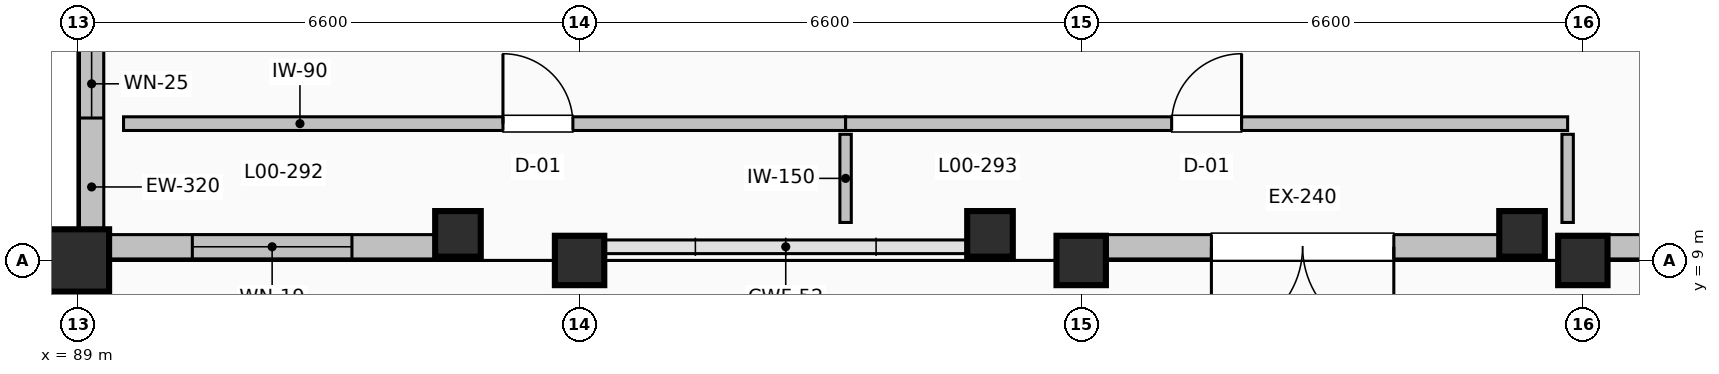
"""IFC4 building model, lengths in metres.
Left out: names, types, materials, properties, quantities, classifications, styles, units other than length and angle.
Written with IfcOpenShell. Run it as: python <this file> out.ifc"""

import sys

from ifc_helpers import new_model, si_unit, direction, frame, frame_2d, origin, origin_2d, place, context, subcontext, project, spatial, rectangle, extrude, element, fill, save


model = new_model("IFC4")
c1 = context("Model", 3, precision=1e-05, world=origin(), true_north=direction((0.0, 1.0)))
c2 = subcontext(c1, "Body", "Model", "MODEL_VIEW")
j1 = project(units=[si_unit("LENGTHUNIT", "METRE"), si_unit("PLANEANGLEUNIT", "RADIAN")], contexts=[c1])
p1 = place(None, origin())
s1 = spatial("IfcSite", under=j1, at=p1, CompositionType="ELEMENT")
p2 = place(p1, origin())
s2 = spatial("IfcBuilding", under=s1, at=p2, CompositionType="ELEMENT")
p3 = place(p2, origin())
s3 = spatial("IfcBuildingStorey", under=s2, at=p3, CompositionType="ELEMENT", Elevation=0.0)
p4 = place(p3, frame((89.0, 9.0, 0.0), z_axis=(0.0, 0.0, 1.0), x_axis=(1.0, 0.0, 0.0)))
e1 = element("IfcColumn", 1, at=p4, inside=s3, PredefinedType="COLUMN", context=c2, shape_type="SweptSolid", body=[
    extrude(rectangle(XDim=0.82, YDim=0.82, at=origin_2d()), origin(), (0.0, 0.0, 1.0), 5.4),
])
for number, where, z_axis, x_axis in (
    (2, (95.6, 9.0, 0.0), (0.0, 0.0, 1.0), (1.0, 0.0, 0.0)),
    (3, (102.2, 9.0, 0.0), (0.0, 0.0, 1.0), (1.0, 0.0, 0.0)),
    (4, (108.8, 9.0, 0.0), (0.0, 0.0, 1.0), (1.0, 0.0, 0.0)),
):
    element("IfcColumn", number, at=place(p3, frame(where, z_axis=z_axis, x_axis=x_axis)), inside=s3, PredefinedType="COLUMN", context=c2, shape_type="SweptSolid", body=[
        extrude(rectangle(XDim=0.65, YDim=0.65, at=origin_2d()), origin(), (0.0, 0.0, 1.0), 5.4),
    ])
for number, where, z_axis, x_axis in (
    (5, (94.0, 9.35, 0.0), (0.0, 0.0, 1.0), (1.0, 0.0, 0.0)),
    (6, (101.0, 9.35, 0.0), (0.0, 0.0, 1.0), (1.0, 0.0, 0.0)),
    (7, (108.0, 9.35, 0.0), (0.0, 0.0, 1.0), (1.0, 0.0, 0.0)),
):
    element("IfcColumn", number, at=place(p3, frame(where, z_axis=z_axis, x_axis=x_axis)), inside=s3, PredefinedType="PILASTER", context=c2, shape_type="SweptSolid", body=[
        extrude(rectangle(XDim=0.6, YDim=0.6, at=origin_2d()), origin(), (0.0, 0.0, 1.0), 5.4),
    ])
p5 = place(p3, frame((114.99, 9.18, 0.0), z_axis=(0.0, 0.0, 1.0), x_axis=(-1.0, 0.0, 0.0)))
e8 = element("IfcWall", 8, at=p5, inside=s3, PredefinedType="SOLIDWALL", context=c2, shape_type="SweptSolid", body=[
    extrude(rectangle(XDim=5.865, YDim=0.32, at=frame_2d((2.933, 0.0))), origin(), (0.0, 0.0, 1.0), 4.342),
])
p6 = place(p5, frame((1.732, 0.0, 0.0)))
e9 = element("IfcOpeningElement", 9, at=p6, cuts=e8, PredefinedType="OPENING", context=c2, shape_type="SweptSolid", body=[
    extrude(rectangle(XDim=2.4, YDim=2.4, at=frame_2d((1.2, 1.2))), frame((0.0, 0.17, 0.0), z_axis=(0.0, -1.0, 0.0), x_axis=(1.0, 0.0, 0.0)), (0.0, 0.0, 1.0), 0.34),
])
p7 = place(p3, frame((107.7, 9.18, 0.0), z_axis=(0.0, 0.0, 1.0), x_axis=(-1.0, 0.0, 0.0)))
e10 = element("IfcWall", 10, at=p7, inside=s3, PredefinedType="SOLIDWALL", context=c2, shape_type="SweptSolid", body=[
    extrude(rectangle(XDim=5.175, YDim=0.32, at=frame_2d((2.587, 0.0))), origin(), (0.0, 0.0, 1.0), 4.342),
])
p8 = place(p7, frame((1.387, 0.0, 0.0)))
e11 = element("IfcOpeningElement", 11, at=p8, cuts=e10, PredefinedType="OPENING", context=c2, shape_type="SweptSolid", body=[
    extrude(rectangle(XDim=2.4, YDim=2.4, at=frame_2d((1.2, 1.2))), frame((0.0, 0.17, 0.0), z_axis=(0.0, -1.0, 0.0), x_axis=(1.0, 0.0, 0.0)), (0.0, 0.0, 1.0), 0.34),
])
p9 = place(p3, frame((93.7, 9.18, 0.0), z_axis=(0.0, 0.0, 1.0), x_axis=(-1.0, 0.0, 0.0)))
e12 = element("IfcWall", 12, at=p9, inside=s3, PredefinedType="SOLIDWALL", context=c2, shape_type="SweptSolid", body=[
    extrude(rectangle(XDim=4.29, YDim=0.32, at=frame_2d((2.145, 0.0))), origin(), (0.0, 0.0, 1.0), 4.342),
])
p10 = place(p9, frame((1.095, 0.0, 1.0)))
e13 = element("IfcOpeningElement", 13, at=p10, cuts=e12, PredefinedType="OPENING", context=c2, shape_type="SweptSolid", body=[
    extrude(rectangle(XDim=2.1, YDim=1.7, at=frame_2d((1.05, 0.85))), frame((0.0, 0.17, 0.0), z_axis=(0.0, -1.0, 0.0), x_axis=(1.0, 0.0, 0.0)), (0.0, 0.0, 1.0), 0.34),
])
p11 = place(p3, frame((89.18, 9.41, 0.0), z_axis=(0.0, 0.0, 1.0), x_axis=(0.0, 1.0, 0.0)))
e14 = element("IfcWall", 14, at=p11, inside=s3, PredefinedType="SOLIDWALL", context=c2, shape_type="SweptSolid", body=[
    extrude(rectangle(XDim=6.38, YDim=0.32, at=frame_2d((3.19, 0.0))), origin(), (0.0, 0.0, 1.0), 4.342),
])
p12 = place(p11, frame((1.464, 0.0, 1.0)))
e15 = element("IfcOpeningElement", 15, at=p12, cuts=e14, PredefinedType="OPENING", context=c2, shape_type="SweptSolid", body=[
    extrude(rectangle(XDim=0.9, YDim=1.4, at=frame_2d((0.45, 0.7))), frame((0.0, 0.17, 0.0), z_axis=(0.0, -1.0, 0.0), x_axis=(1.0, 0.0, 0.0)), (0.0, 0.0, 1.0), 0.34),
])
p13 = place(p11, frame((4.016, 0.0, 1.0)))
e16 = element("IfcOpeningElement", 16, at=p13, cuts=e14, PredefinedType="OPENING", context=c2, shape_type="SweptSolid", body=[
    extrude(rectangle(XDim=0.9, YDim=1.4, at=frame_2d((0.45, 0.7))), frame((0.0, 0.17, 0.0), z_axis=(0.0, -1.0, 0.0), x_axis=(1.0, 0.0, 0.0)), (0.0, 0.0, 1.0), 0.34),
])
p14 = place(p3, frame((89.6, 10.8, 0.0), z_axis=(0.0, 0.0, 1.0), x_axis=(1.0, 0.0, 0.0)))
e17 = element("IfcWall", 17, at=p14, inside=s3, PredefinedType="PARTITIONING", context=c2, shape_type="SweptSolid", body=[
    extrude(rectangle(XDim=9.5, YDim=0.18, at=frame_2d((4.75, 0.0))), origin(), (0.0, 0.0, 1.0), 5.092),
])
p15 = place(p14, frame((4.992, 0.0, 0.0)))
e18 = element("IfcOpeningElement", 18, at=p15, cuts=e17, PredefinedType="OPENING", context=c2, shape_type="SweptSolid", body=[
    extrude(rectangle(XDim=0.92, YDim=2.05, at=frame_2d((0.46, 1.025))), frame((0.0, 0.1, 0.0), z_axis=(0.0, -1.0, 0.0), x_axis=(1.0, 0.0, 0.0)), (0.0, 0.0, 1.0), 0.2),
])
p16 = place(p3, frame((99.1, 9.5, 0.0), z_axis=(0.0, 0.0, 1.0), x_axis=(0.0, 1.0, 0.0)))
e19 = element("IfcWall", 19, at=p16, inside=s3, PredefinedType="PARTITIONING", context=c2, shape_type="SweptSolid", body=[
    extrude(rectangle(XDim=1.16, YDim=0.15, at=frame_2d((0.58, 0.0))), origin(), (0.0, 0.0, 1.0), 5.092),
])
p17 = place(p3, frame((108.6, 9.5, 0.0), z_axis=(0.0, 0.0, 1.0), x_axis=(0.0, 1.0, 0.0)))
e20 = element("IfcWall", 20, at=p17, inside=s3, PredefinedType="PARTITIONING", context=c2, shape_type="SweptSolid", body=[
    extrude(rectangle(XDim=1.16, YDim=0.15, at=frame_2d((0.58, 0.0))), origin(), (0.0, 0.0, 1.0), 4.342),
])
p18 = place(p3, frame((99.1, 10.8, 0.0), z_axis=(0.0, 0.0, 1.0), x_axis=(1.0, 0.0, 0.0)))
e21 = element("IfcWall", 21, at=p18, inside=s3, PredefinedType="PARTITIONING", context=c2, shape_type="SweptSolid", body=[
    extrude(rectangle(XDim=9.5, YDim=0.18, at=frame_2d((4.75, 0.0))), origin(), (0.0, 0.0, 1.0), 5.092),
])
p19 = place(p18, frame((4.29, 0.0, 0.0)))
e22 = element("IfcOpeningElement", 22, at=p19, cuts=e21, PredefinedType="OPENING", context=c2, shape_type="SweptSolid", body=[
    extrude(rectangle(XDim=0.92, YDim=2.05, at=frame_2d((0.46, 1.025))), frame((0.0, 0.1, 0.0), z_axis=(0.0, -1.0, 0.0), x_axis=(1.0, 0.0, 0.0)), (0.0, 0.0, 1.0), 0.2),
])
p20 = place(p8, origin())
e23 = element("IfcDoor", 23, at=p20, inside=s3, OperationType="DOUBLE_DOOR_SINGLE_SWING", PredefinedType="DOOR", context=c2, shape_type="SweptSolid", body=[
    extrude(rectangle(XDim=2.4, YDim=2.4, at=frame_2d((1.2, 1.2))), frame((0.0, 0.025, 0.0), z_axis=(0.0, -1.0, 0.0), x_axis=(1.0, 0.0, 0.0)), (0.0, 0.0, 1.0), 0.05),
])
fill(e11, e23)
p21 = place(p10, origin())
e24 = element("IfcWindow", 24, at=p21, inside=s3, PartitioningType="SINGLE_PANEL", PredefinedType="WINDOW", context=c2, shape_type="SweptSolid", body=[
    extrude(rectangle(XDim=2.1, YDim=1.7, at=frame_2d((1.05, 0.85))), frame((0.0, 0.03, 0.0), z_axis=(0.0, -1.0, 0.0), x_axis=(1.0, 0.0, 0.0)), (0.0, 0.0, 1.0), 0.06),
])
fill(e13, e24)
p22 = place(p12, origin())
e25 = element("IfcWindow", 25, at=p22, inside=s3, PartitioningType="SINGLE_PANEL", PredefinedType="WINDOW", context=c2, shape_type="SweptSolid", body=[
    extrude(rectangle(XDim=0.9, YDim=1.4, at=frame_2d((0.45, 0.7))), frame((0.0, 0.03, 0.0), z_axis=(0.0, -1.0, 0.0), x_axis=(1.0, 0.0, 0.0)), (0.0, 0.0, 1.0), 0.06),
])
fill(e15, e25)
p23 = place(p15, origin())
e26 = element("IfcDoor", 26, at=p23, inside=s3, OperationType="SINGLE_SWING_LEFT", PredefinedType="DOOR", context=c2, shape_type="SweptSolid", body=[
    extrude(rectangle(XDim=0.92, YDim=2.05, at=frame_2d((0.46, 1.025))), frame((0.0, 0.025, 0.0), z_axis=(0.0, -1.0, 0.0), x_axis=(1.0, 0.0, 0.0)), (0.0, 0.0, 1.0), 0.05),
])
fill(e18, e26)
p24 = place(p19, origin())
e27 = element("IfcDoor", 27, at=p24, inside=s3, OperationType="SINGLE_SWING_RIGHT", PredefinedType="DOOR", context=c2, shape_type="SweptSolid", body=[
    extrude(rectangle(XDim=0.92, YDim=2.05, at=frame_2d((0.46, 1.025))), frame((0.0, 0.025, 0.0), z_axis=(0.0, -1.0, 0.0), x_axis=(1.0, 0.0, 0.0)), (0.0, 0.0, 1.0), 0.05),
])
fill(e22, e27)
save(model, sys.argv[1])
